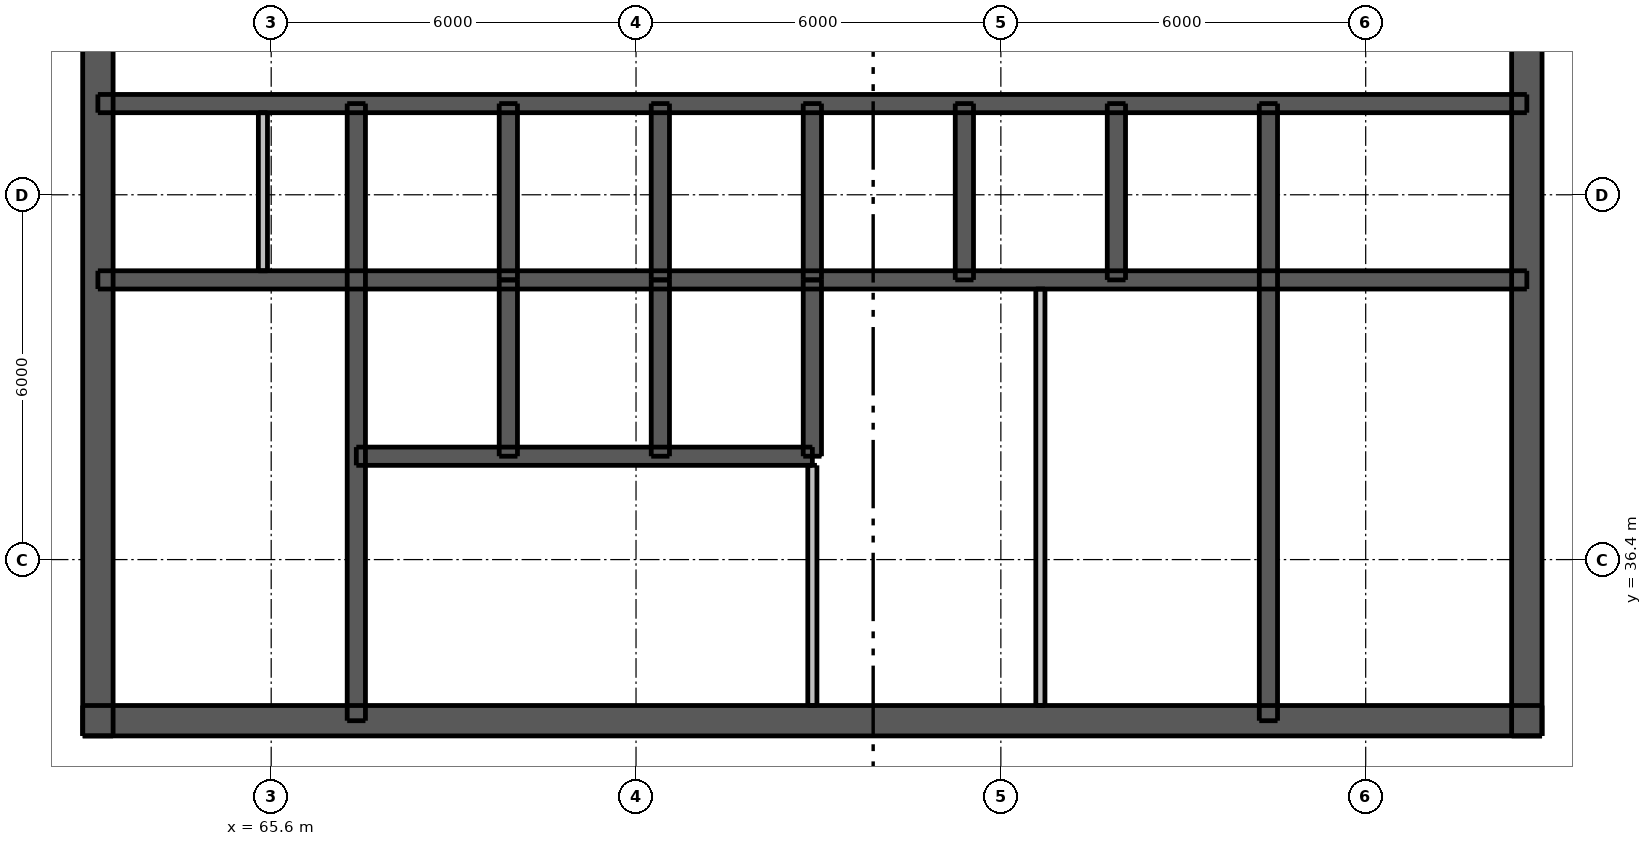
"""IFC4 building model, lengths in metres.
Left out: names, types, materials, properties, quantities, classifications, styles, units other than length and angle.
Written with IfcOpenShell. Run it as: python <this file> out.ifc"""

import sys

from ifc_helpers import new_model, si_unit, direction, frame, frame_2d, origin, place, context, subcontext, project, spatial, rectangle, extrude, element, fill, save


model = new_model("IFC4")
c1 = context("Model", 3, precision=1e-05, world=origin(), true_north=direction((0.0, 1.0)))
c2 = subcontext(c1, "Body", "Model", "MODEL_VIEW")
j1 = project(units=[si_unit("LENGTHUNIT", "METRE"), si_unit("PLANEANGLEUNIT", "RADIAN")], contexts=[c1])
p1 = place(None, origin())
s1 = spatial("IfcSite", under=j1, at=p1, CompositionType="ELEMENT")
p2 = place(p1, origin())
s2 = spatial("IfcBuilding", under=s1, at=p2, CompositionType="ELEMENT")
p3 = place(p2, frame((0.0, 0.0, 258.7)))
s3 = spatial("IfcBuildingStorey", under=s2, at=p3, CompositionType="ELEMENT", Elevation=258.7)
p4 = place(p3, frame((62.5, 33.75, 0.0), z_axis=(0.0, 0.0, 1.0), x_axis=(1.0, 0.0, 0.0)))
e1 = element("IfcWall", 1, at=p4, inside=s3, PredefinedType="SHEAR", context=c2, shape_type="SweptSolid", body=[
    extrude(rectangle(XDim=24.0, YDim=0.5, at=frame_2d((12.0, 0.0))), origin(), (0.0, 0.0, 1.0), 3.05),
])
p5 = place(p4, frame((1.875, 0.0, 0.0)))
e2 = element("IfcOpeningElement", 2, at=p5, cuts=e1, PredefinedType="OPENING", context=c2, shape_type="SweptSolid", body=[
    extrude(rectangle(XDim=1.1, YDim=2.1, at=frame_2d((0.55, 1.05))), frame((0.0, 0.26, 0.0), z_axis=(0.0, -1.0, 0.0), x_axis=(1.0, 0.0, 0.0)), (0.0, 0.0, 1.0), 0.52),
])
p6 = place(p4, frame((21.025, 0.0, 0.0)))
e3 = element("IfcOpeningElement", 3, at=p6, cuts=e1, PredefinedType="OPENING", context=c2, shape_type="SweptSolid", body=[
    extrude(rectangle(XDim=1.1, YDim=2.1, at=frame_2d((0.55, 1.05))), frame((0.0, 0.26, 0.0), z_axis=(0.0, -1.0, 0.0), x_axis=(1.0, 0.0, 0.0)), (0.0, 0.0, 1.0), 0.52),
])
p7 = place(p4, frame((8.0, 0.0, 0.0)))
e4 = element("IfcOpeningElement", 4, at=p7, cuts=e1, PredefinedType="OPENING", context=c2, shape_type="SweptSolid", body=[
    extrude(rectangle(XDim=1.1, YDim=2.1, at=frame_2d((0.55, 1.05))), frame((0.0, 0.26, 0.0), z_axis=(0.0, -1.0, 0.0), x_axis=(1.0, 0.0, 0.0)), (0.0, 0.0, 1.0), 0.52),
])
p8 = place(p4, frame((13.5, 0.0, 0.0)))
e5 = element("IfcOpeningElement", 5, at=p8, cuts=e1, PredefinedType="OPENING", context=c2, shape_type="SweptSolid", body=[
    extrude(rectangle(XDim=0.9, YDim=2.1, at=frame_2d((0.45, 1.05))), frame((0.0, 0.26, 0.0), z_axis=(0.0, -1.0, 0.0), x_axis=(1.0, 0.0, 0.0)), (0.0, 0.0, 1.0), 0.52),
])
p9 = place(p4, frame((17.1, 0.0, 0.0)))
e6 = element("IfcOpeningElement", 6, at=p9, cuts=e1, PredefinedType="OPENING", context=c2, shape_type="SweptSolid", body=[
    extrude(rectangle(XDim=0.9, YDim=2.1, at=frame_2d((0.45, 1.05))), frame((0.0, 0.26, 0.0), z_axis=(0.0, -1.0, 0.0), x_axis=(1.0, 0.0, 0.0)), (0.0, 0.0, 1.0), 0.52),
])
p10 = place(p3, frame((62.75, 33.5, 0.0), z_axis=(0.0, 0.0, 1.0), x_axis=(0.0, 1.0, 0.0)))
e7 = element("IfcWall", 7, at=p10, inside=s3, PredefinedType="SHEAR", context=c2, shape_type="SweptSolid", body=[
    extrude(rectangle(XDim=24.0, YDim=0.5, at=frame_2d((12.0, 0.0))), origin(), (0.0, 0.0, 1.0), 3.05),
])
p11 = place(p10, frame((11.2, 0.0, 0.0)))
e8 = element("IfcOpeningElement", 8, at=p11, cuts=e7, PredefinedType="OPENING", context=c2, shape_type="SweptSolid", body=[
    extrude(rectangle(XDim=1.6, YDim=2.1, at=frame_2d((0.8, 1.05))), frame((0.0, 0.26, 0.0), z_axis=(0.0, -1.0, 0.0), x_axis=(1.0, 0.0, 0.0)), (0.0, 0.0, 1.0), 0.52),
])
p12 = place(p3, frame((86.25, 33.5, 0.0), z_axis=(0.0, 0.0, 1.0), x_axis=(0.0, 1.0, 0.0)))
e9 = element("IfcWall", 9, at=p12, inside=s3, PredefinedType="SHEAR", context=c2, shape_type="SweptSolid", body=[
    extrude(rectangle(XDim=24.0, YDim=0.5, at=frame_2d((12.0, 0.0))), origin(), (0.0, 0.0, 1.0), 3.05),
])
p13 = place(p12, frame((11.2, 0.0, 0.0)))
e10 = element("IfcOpeningElement", 10, at=p13, cuts=e9, PredefinedType="OPENING", context=c2, shape_type="SweptSolid", body=[
    extrude(rectangle(XDim=1.6, YDim=2.1, at=frame_2d((0.8, 1.05))), frame((0.0, 0.26, 0.0), z_axis=(0.0, -1.0, 0.0), x_axis=(1.0, 0.0, 0.0)), (0.0, 0.0, 1.0), 0.52),
])
p14 = place(p3, frame((62.75, 41.0, 0.0), z_axis=(0.0, 0.0, 1.0), x_axis=(1.0, 0.0, 0.0)))
e11 = element("IfcWall", 11, at=p14, inside=s3, PredefinedType="SHEAR", context=c2, shape_type="SweptSolid", body=[
    extrude(rectangle(XDim=23.5, YDim=0.3, at=frame_2d((11.75, 0.0))), origin(), (0.0, 0.0, 1.0), 3.05),
])
p15 = place(p3, frame((62.75, 43.9, 0.0), z_axis=(0.0, 0.0, 1.0), x_axis=(1.0, 0.0, 0.0)))
e12 = element("IfcWall", 12, at=p15, inside=s3, PredefinedType="SHEAR", context=c2, shape_type="SweptSolid", body=[
    extrude(rectangle(XDim=23.5, YDim=0.3, at=frame_2d((11.75, 0.0))), origin(), (0.0, 0.0, 1.0), 3.05),
])
p16 = place(p15, frame((1.032, 0.0, 0.0)))
e13 = element("IfcOpeningElement", 13, at=p16, cuts=e12, PredefinedType="OPENING", context=c2, shape_type="SweptSolid", body=[
    extrude(rectangle(XDim=0.9, YDim=2.1, at=frame_2d((0.45, 1.05))), frame((0.0, 0.16, 0.0), z_axis=(0.0, -1.0, 0.0), x_axis=(1.0, 0.0, 0.0)), (0.0, 0.0, 1.0), 0.32),
])
p17 = place(p15, frame((3.007, 0.0, 0.0)))
e14 = element("IfcOpeningElement", 14, at=p17, cuts=e12, PredefinedType="OPENING", context=c2, shape_type="SweptSolid", body=[
    extrude(rectangle(XDim=0.8, YDim=2.1, at=frame_2d((0.4, 1.05))), frame((0.0, 0.16, 0.0), z_axis=(0.0, -1.0, 0.0), x_axis=(1.0, 0.0, 0.0)), (0.0, 0.0, 1.0), 0.32),
])
p18 = place(p15, frame((20.875, 0.0, 0.0)))
e15 = element("IfcOpeningElement", 15, at=p18, cuts=e12, PredefinedType="OPENING", context=c2, shape_type="SweptSolid", body=[
    extrude(rectangle(XDim=0.9, YDim=2.1, at=frame_2d((0.45, 1.05))), frame((0.0, 0.16, 0.0), z_axis=(0.0, -1.0, 0.0), x_axis=(1.0, 0.0, 0.0)), (0.0, 0.0, 1.0), 0.32),
])
p19 = place(p15, frame((5.05, 0.0, 0.0)))
e16 = element("IfcOpeningElement", 16, at=p19, cuts=e12, PredefinedType="OPENING", context=c2, shape_type="SweptSolid", body=[
    extrude(rectangle(XDim=0.9, YDim=2.1, at=frame_2d((0.45, 1.05))), frame((0.0, 0.16, 0.0), z_axis=(0.0, -1.0, 0.0), x_axis=(1.0, 0.0, 0.0)), (0.0, 0.0, 1.0), 0.32),
])
p20 = place(p15, frame((10.05, 0.0, 0.0)))
e17 = element("IfcOpeningElement", 17, at=p20, cuts=e12, PredefinedType="OPENING", context=c2, shape_type="SweptSolid", body=[
    extrude(rectangle(XDim=0.9, YDim=2.1, at=frame_2d((0.45, 1.05))), frame((0.0, 0.16, 0.0), z_axis=(0.0, -1.0, 0.0), x_axis=(1.0, 0.0, 0.0)), (0.0, 0.0, 1.0), 0.32),
])
p21 = place(p15, frame((12.55, 0.0, 0.0)))
e18 = element("IfcOpeningElement", 18, at=p21, cuts=e12, PredefinedType="OPENING", context=c2, shape_type="SweptSolid", body=[
    extrude(rectangle(XDim=0.9, YDim=2.1, at=frame_2d((0.45, 1.05))), frame((0.0, 0.16, 0.0), z_axis=(0.0, -1.0, 0.0), x_axis=(1.0, 0.0, 0.0)), (0.0, 0.0, 1.0), 0.32),
])
p22 = place(p15, frame((17.55, 0.0, 0.0)))
e19 = element("IfcOpeningElement", 19, at=p22, cuts=e12, PredefinedType="OPENING", context=c2, shape_type="SweptSolid", body=[
    extrude(rectangle(XDim=0.9, YDim=2.1, at=frame_2d((0.45, 1.05))), frame((0.0, 0.16, 0.0), z_axis=(0.0, -1.0, 0.0), x_axis=(1.0, 0.0, 0.0)), (0.0, 0.0, 1.0), 0.32),
])
p23 = place(p3, frame((67.0, 33.75, 0.0), z_axis=(0.0, 0.0, 1.0), x_axis=(0.0, 1.0, 0.0)))
e20 = element("IfcWall", 20, at=p23, inside=s3, PredefinedType="SHEAR", context=c2, shape_type="SweptSolid", body=[
    extrude(rectangle(XDim=10.15, YDim=0.3, at=frame_2d((5.075, 0.0))), origin(), (0.0, 0.0, 1.0), 3.05),
])
p24 = place(p23, frame((0.45, 0.0, 0.0)))
e21 = element("IfcOpeningElement", 21, at=p24, cuts=e20, PredefinedType="OPENING", context=c2, shape_type="SweptSolid", body=[
    extrude(rectangle(XDim=1.1, YDim=2.1, at=frame_2d((0.55, 1.05))), frame((0.0, 0.16, 0.0), z_axis=(0.0, -1.0, 0.0), x_axis=(1.0, 0.0, 0.0)), (0.0, 0.0, 1.0), 0.32),
])
p25 = place(p3, frame((82.0, 33.75, 0.0), z_axis=(0.0, 0.0, 1.0), x_axis=(0.0, 1.0, 0.0)))
e22 = element("IfcWall", 22, at=p25, inside=s3, PredefinedType="SHEAR", context=c2, shape_type="SweptSolid", body=[
    extrude(rectangle(XDim=10.15, YDim=0.3, at=frame_2d((5.075, 0.0))), origin(), (0.0, 0.0, 1.0), 3.05),
])
for number, where, z_axis, x_axis in (
    (23, (69.5, 41.0, 0.0), (0.0, 0.0, 1.0), (0.0, 1.0, 0.0)),
    (24, (72.0, 41.0, 0.0), (0.0, 0.0, 1.0), (0.0, 1.0, 0.0)),
    (25, (74.5, 41.0, 0.0), (0.0, 0.0, 1.0), (0.0, 1.0, 0.0)),
    (26, (77.0, 41.0, 0.0), (0.0, 0.0, 1.0), (0.0, 1.0, 0.0)),
    (27, (79.5, 41.0, 0.0), (0.0, 0.0, 1.0), (0.0, 1.0, 0.0)),
):
    element("IfcWall", number, at=place(p3, frame(where, z_axis=z_axis, x_axis=x_axis)), inside=s3, PredefinedType="SHEAR", context=c2, shape_type="SweptSolid", body=[
        extrude(rectangle(XDim=2.9, YDim=0.3, at=frame_2d((1.45, 0.0))), origin(), (0.0, 0.0, 1.0), 3.05),
    ])
p26 = place(p3, frame((67.0, 38.1, 0.0), z_axis=(0.0, 0.0, 1.0), x_axis=(1.0, 0.0, 0.0)))
e28 = element("IfcWall", 28, at=p26, inside=s3, PredefinedType="SHEAR", context=c2, shape_type="SweptSolid", body=[
    extrude(rectangle(XDim=7.5, YDim=0.3, at=frame_2d((3.75, 0.0))), origin(), (0.0, 0.0, 1.0), 3.05),
])
p27 = place(p26, frame((0.7, 0.0, 0.0)))
e29 = element("IfcOpeningElement", 29, at=p27, cuts=e28, PredefinedType="OPENING", context=c2, shape_type="SweptSolid", body=[
    extrude(rectangle(XDim=1.1, YDim=2.1, at=frame_2d((0.55, 1.05))), frame((0.0, 0.16, 0.0), z_axis=(0.0, -1.0, 0.0), x_axis=(1.0, 0.0, 0.0)), (0.0, 0.0, 1.0), 0.32),
])
p28 = place(p26, frame((3.2, 0.0, 0.0)))
e30 = element("IfcOpeningElement", 30, at=p28, cuts=e28, PredefinedType="OPENING", context=c2, shape_type="SweptSolid", body=[
    extrude(rectangle(XDim=1.1, YDim=2.1, at=frame_2d((0.55, 1.05))), frame((0.0, 0.16, 0.0), z_axis=(0.0, -1.0, 0.0), x_axis=(1.0, 0.0, 0.0)), (0.0, 0.0, 1.0), 0.32),
])
p29 = place(p26, frame((5.65, 0.0, 0.0)))
e31 = element("IfcOpeningElement", 31, at=p29, cuts=e28, PredefinedType="OPENING", context=c2, shape_type="SweptSolid", body=[
    extrude(rectangle(XDim=1.2, YDim=2.1, at=frame_2d((0.6, 1.05))), frame((0.0, 0.16, 0.0), z_axis=(0.0, -1.0, 0.0), x_axis=(1.0, 0.0, 0.0)), (0.0, 0.0, 1.0), 0.32),
])
for number, where, z_axis, x_axis in (
    (32, (69.5, 38.1, 0.0), (0.0, 0.0, 1.0), (0.0, 1.0, 0.0)),
    (33, (72.0, 38.1, 0.0), (0.0, 0.0, 1.0), (0.0, 1.0, 0.0)),
    (34, (74.5, 38.1, 0.0), (0.0, 0.0, 1.0), (0.0, 1.0, 0.0)),
):
    element("IfcWall", number, at=place(p3, frame(where, z_axis=z_axis, x_axis=x_axis)), inside=s3, PredefinedType="SHEAR", context=c2, shape_type="SweptSolid", body=[
        extrude(rectangle(XDim=2.9, YDim=0.3, at=frame_2d((1.45, 0.0))), origin(), (0.0, 0.0, 1.0), 3.05),
    ])
p30 = place(p3, frame((74.5, 34.0, 0.0), z_axis=(0.0, 0.0, 1.0), x_axis=(0.0, 1.0, 0.0)))
e35 = element("IfcWall", 35, at=p30, inside=s3, PredefinedType="PLUMBINGWALL", context=c2, shape_type="SweptSolid", body=[
    extrude(rectangle(XDim=3.95, YDim=0.15, at=frame_2d((1.975, 0.0))), origin(), (0.0, 0.0, 1.0), 3.05),
])
p31 = place(p3, frame((78.25, 34.0, 0.0), z_axis=(0.0, 0.0, 1.0), x_axis=(0.0, 1.0, 0.0)))
e36 = element("IfcWall", 36, at=p31, inside=s3, PredefinedType="PLUMBINGWALL", context=c2, shape_type="SweptSolid", body=[
    extrude(rectangle(XDim=6.85, YDim=0.15, at=frame_2d((3.425, 0.0))), origin(), (0.0, 0.0, 1.0), 3.05),
])
p32 = place(p3, frame((65.464, 41.15, 0.0), z_axis=(0.0, 0.0, 1.0), x_axis=(0.0, 1.0, 0.0)))
e37 = element("IfcWall", 37, at=p32, inside=s3, PredefinedType="PLUMBINGWALL", context=c2, shape_type="SweptSolid", body=[
    extrude(rectangle(XDim=2.6, YDim=0.15, at=frame_2d((1.3, 0.0))), origin(), (0.0, 0.0, 1.0), 3.05),
])
p33 = place(p5, origin())
e38 = element("IfcDoor", 38, at=p33, inside=s3, OperationType="SINGLE_SWING_LEFT", PredefinedType="DOOR", context=c2, shape_type="SweptSolid", body=[
    extrude(rectangle(XDim=1.1, YDim=2.1, at=frame_2d((0.55, 1.05))), frame((0.0, 0.237, 0.0), z_axis=(0.0, -1.0, 0.0), x_axis=(1.0, 0.0, 0.0)), (0.0, 0.0, 1.0), 0.05),
])
fill(e2, e38)
p34 = place(p6, origin())
e39 = element("IfcDoor", 39, at=p34, inside=s3, OperationType="SINGLE_SWING_RIGHT", PredefinedType="DOOR", context=c2, shape_type="SweptSolid", body=[
    extrude(rectangle(XDim=1.1, YDim=2.1, at=frame_2d((0.55, 1.05))), frame((0.0, 0.237, 0.0), z_axis=(0.0, -1.0, 0.0), x_axis=(1.0, 0.0, 0.0)), (0.0, 0.0, 1.0), 0.05),
])
fill(e3, e39)
p35 = place(p11, origin())
e40 = element("IfcDoor", 40, at=p35, inside=s3, OperationType="DOUBLE_DOOR_SINGLE_SWING", PredefinedType="DOOR", context=c2, shape_type="SweptSolid", body=[
    extrude(rectangle(XDim=1.6, YDim=2.1, at=frame_2d((0.8, 1.05))), frame((0.0, -0.188, 0.0), z_axis=(0.0, -1.0, 0.0), x_axis=(1.0, 0.0, 0.0)), (0.0, 0.0, 1.0), 0.05),
])
fill(e8, e40)
p36 = place(p13, origin())
e41 = element("IfcDoor", 41, at=p36, inside=s3, OperationType="DOUBLE_DOOR_SINGLE_SWING", PredefinedType="DOOR", context=c2, shape_type="SweptSolid", body=[
    extrude(rectangle(XDim=1.6, YDim=2.1, at=frame_2d((0.8, 1.05))), frame((0.0, 0.237, 0.0), z_axis=(0.0, -1.0, 0.0), x_axis=(1.0, 0.0, 0.0)), (0.0, 0.0, 1.0), 0.05),
])
fill(e10, e41)
p37 = place(p7, origin())
e42 = element("IfcDoor", 42, at=p37, inside=s3, OperationType="SINGLE_SWING_LEFT", PredefinedType="DOOR", context=c2, shape_type="SweptSolid", body=[
    extrude(rectangle(XDim=1.1, YDim=2.1, at=frame_2d((0.55, 1.05))), frame((0.0, 0.237, 0.0), z_axis=(0.0, -1.0, 0.0), x_axis=(1.0, 0.0, 0.0)), (0.0, 0.0, 1.0), 0.05),
])
fill(e4, e42)
p38 = place(p24, origin())
e43 = element("IfcDoor", 43, at=p38, inside=s3, OperationType="SINGLE_SWING_RIGHT", PredefinedType="DOOR", context=c2, shape_type="SweptSolid", body=[
    extrude(rectangle(XDim=1.1, YDim=2.1, at=frame_2d((0.55, 1.05))), frame((0.0, -0.087, 0.0), z_axis=(0.0, -1.0, 0.0), x_axis=(1.0, 0.0, 0.0)), (0.0, 0.0, 1.0), 0.05),
])
fill(e21, e43)
p39 = place(p8, origin())
e44 = element("IfcDoor", 44, at=p39, inside=s3, OperationType="SINGLE_SWING_LEFT", PredefinedType="DOOR", context=c2, shape_type="SweptSolid", body=[
    extrude(rectangle(XDim=0.9, YDim=2.1, at=frame_2d((0.45, 1.05))), frame((0.0, 0.237, 0.0), z_axis=(0.0, -1.0, 0.0), x_axis=(1.0, 0.0, 0.0)), (0.0, 0.0, 1.0), 0.05),
])
fill(e5, e44)
p40 = place(p9, origin())
e45 = element("IfcDoor", 45, at=p40, inside=s3, OperationType="SINGLE_SWING_LEFT", PredefinedType="DOOR", context=c2, shape_type="SweptSolid", body=[
    extrude(rectangle(XDim=0.9, YDim=2.1, at=frame_2d((0.45, 1.05))), frame((0.0, 0.237, 0.0), z_axis=(0.0, -1.0, 0.0), x_axis=(1.0, 0.0, 0.0)), (0.0, 0.0, 1.0), 0.05),
])
fill(e6, e45)
p41 = place(p16, origin())
e46 = element("IfcDoor", 46, at=p41, inside=s3, OperationType="SINGLE_SWING_LEFT", PredefinedType="DOOR", context=c2, shape_type="SweptSolid", body=[
    extrude(rectangle(XDim=0.9, YDim=2.1, at=frame_2d((0.45, 1.05))), frame((0.0, -0.087, 0.0), z_axis=(0.0, -1.0, 0.0), x_axis=(1.0, 0.0, 0.0)), (0.0, 0.0, 1.0), 0.05),
])
fill(e13, e46)
p42 = place(p17, origin())
e47 = element("IfcDoor", 47, at=p42, inside=s3, OperationType="SINGLE_SWING_RIGHT", PredefinedType="DOOR", context=c2, shape_type="SweptSolid", body=[
    extrude(rectangle(XDim=0.8, YDim=2.1, at=frame_2d((0.4, 1.05))), frame((0.0, -0.087, 0.0), z_axis=(0.0, -1.0, 0.0), x_axis=(1.0, 0.0, 0.0)), (0.0, 0.0, 1.0), 0.05),
])
fill(e14, e47)
p43 = place(p18, origin())
e48 = element("IfcDoor", 48, at=p43, inside=s3, OperationType="SINGLE_SWING_LEFT", PredefinedType="DOOR", context=c2, shape_type="SweptSolid", body=[
    extrude(rectangle(XDim=0.9, YDim=2.1, at=frame_2d((0.45, 1.05))), frame((0.0, -0.087, 0.0), z_axis=(0.0, -1.0, 0.0), x_axis=(1.0, 0.0, 0.0)), (0.0, 0.0, 1.0), 0.05),
])
fill(e15, e48)
p44 = place(p19, origin())
e49 = element("IfcDoor", 49, at=p44, inside=s3, OperationType="SINGLE_SWING_RIGHT", PredefinedType="DOOR", context=c2, shape_type="SweptSolid", body=[
    extrude(rectangle(XDim=0.9, YDim=2.1, at=frame_2d((0.45, 1.05))), frame((0.0, -0.087, 0.0), z_axis=(0.0, -1.0, 0.0), x_axis=(1.0, 0.0, 0.0)), (0.0, 0.0, 1.0), 0.05),
])
fill(e16, e49)
p45 = place(p20, origin())
e50 = element("IfcDoor", 50, at=p45, inside=s3, OperationType="SINGLE_SWING_RIGHT", PredefinedType="DOOR", context=c2, shape_type="SweptSolid", body=[
    extrude(rectangle(XDim=0.9, YDim=2.1, at=frame_2d((0.45, 1.05))), frame((0.0, -0.087, 0.0), z_axis=(0.0, -1.0, 0.0), x_axis=(1.0, 0.0, 0.0)), (0.0, 0.0, 1.0), 0.05),
])
fill(e17, e50)
p46 = place(p21, origin())
e51 = element("IfcDoor", 51, at=p46, inside=s3, OperationType="SINGLE_SWING_LEFT", PredefinedType="DOOR", context=c2, shape_type="SweptSolid", body=[
    extrude(rectangle(XDim=0.9, YDim=2.1, at=frame_2d((0.45, 1.05))), frame((0.0, -0.087, 0.0), z_axis=(0.0, -1.0, 0.0), x_axis=(1.0, 0.0, 0.0)), (0.0, 0.0, 1.0), 0.05),
])
fill(e18, e51)
p47 = place(p22, origin())
e52 = element("IfcDoor", 52, at=p47, inside=s3, OperationType="SINGLE_SWING_LEFT", PredefinedType="DOOR", context=c2, shape_type="SweptSolid", body=[
    extrude(rectangle(XDim=0.9, YDim=2.1, at=frame_2d((0.45, 1.05))), frame((0.0, -0.087, 0.0), z_axis=(0.0, -1.0, 0.0), x_axis=(1.0, 0.0, 0.0)), (0.0, 0.0, 1.0), 0.05),
])
fill(e19, e52)
p48 = place(p27, origin())
e53 = element("IfcDoor", 53, at=p48, inside=s3, OperationType="DOUBLE_DOOR_SLIDING", PredefinedType="DOOR", context=c2, shape_type="SweptSolid", body=[
    extrude(rectangle(XDim=1.1, YDim=2.1, at=frame_2d((0.55, 1.05))), frame((0.0, 0.025, 0.0), z_axis=(0.0, -1.0, 0.0), x_axis=(1.0, 0.0, 0.0)), (0.0, 0.0, 1.0), 0.05),
])
fill(e29, e53)
p49 = place(p28, origin())
e54 = element("IfcDoor", 54, at=p49, inside=s3, OperationType="DOUBLE_DOOR_SLIDING", PredefinedType="DOOR", context=c2, shape_type="SweptSolid", body=[
    extrude(rectangle(XDim=1.1, YDim=2.1, at=frame_2d((0.55, 1.05))), frame((0.0, 0.025, 0.0), z_axis=(0.0, -1.0, 0.0), x_axis=(1.0, 0.0, 0.0)), (0.0, 0.0, 1.0), 0.05),
])
fill(e30, e54)
p50 = place(p29, origin())
e55 = element("IfcDoor", 55, at=p50, inside=s3, OperationType="DOUBLE_DOOR_SLIDING", PredefinedType="DOOR", context=c2, shape_type="SweptSolid", body=[
    extrude(rectangle(XDim=1.2, YDim=2.1, at=frame_2d((0.6, 1.05))), frame((0.0, 0.025, 0.0), z_axis=(0.0, -1.0, 0.0), x_axis=(1.0, 0.0, 0.0)), (0.0, 0.0, 1.0), 0.05),
])
fill(e31, e55)
save(model, sys.argv[1])
